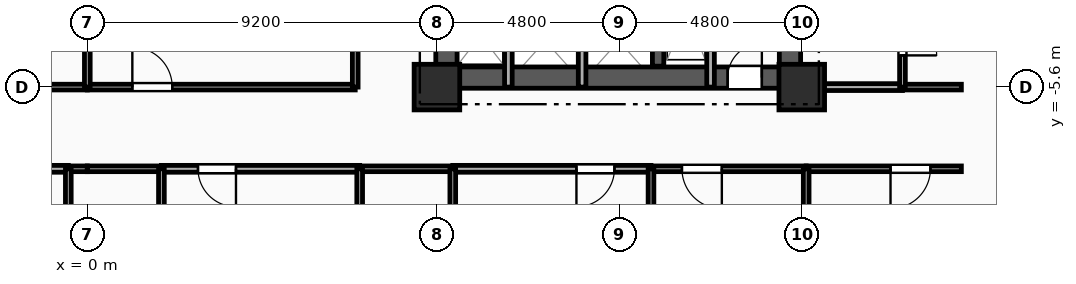
"""IFC4 building model, lengths in metres.
Left out: names, types, materials, properties, quantities, classifications, styles, units other than length and angle.
Written with IfcOpenShell. Run it as: python <this file> out.ifc"""

import sys

from ifc_helpers import new_model, si_unit, direction, frame, frame_2d, origin, origin_2d, place, context, subcontext, project, spatial, rectangle, extrude, element, fill, save


model = new_model("IFC4")
c1 = context("Model", 3, precision=1e-05, world=origin(), true_north=direction((0.0, 1.0)))
c2 = subcontext(c1, "Body", "Model", "MODEL_VIEW")
j1 = project(units=[si_unit("LENGTHUNIT", "METRE"), si_unit("PLANEANGLEUNIT", "RADIAN")], contexts=[c1])
p1 = place(None, origin())
s1 = spatial("IfcSite", under=j1, at=p1, CompositionType="ELEMENT")
p2 = place(p1, origin())
s2 = spatial("IfcBuilding", under=s1, at=p2, CompositionType="ELEMENT")
p3 = place(p2, frame((0.0, 0.0, 33.7)))
s3 = spatial("IfcBuildingStorey", under=s2, at=p3, CompositionType="ELEMENT", Elevation=33.7)
for number, where, z_axis, x_axis in (
    (1, (9.2, -5.6, 0.0), (0.0, 0.0, 1.0), (1.0, 0.0, 0.0)),
    (2, (18.8, -5.6, 0.0), (0.0, 0.0, 1.0), (1.0, 0.0, 0.0)),
):
    element("IfcColumn", number, at=place(p3, frame(where, z_axis=z_axis, x_axis=x_axis)), inside=s3, PredefinedType="COLUMN", context=c2, shape_type="SweptSolid", body=[
        extrude(rectangle(XDim=1.2, YDim=1.2, at=origin_2d()), origin(), (0.0, 0.0, 1.0), 3.35),
    ])
p4 = place(p3, frame((9.2, -5.35, 0.0), z_axis=(0.0, 0.0, 1.0), x_axis=(1.0, 0.0, 0.0)))
e3 = element("IfcWall", 3, at=p4, inside=s3, PredefinedType="SHEAR", context=c2, shape_type="SweptSolid", body=[
    extrude(rectangle(XDim=9.6, YDim=0.56, at=frame_2d((4.8, 0.0))), origin(), (0.0, 0.0, 1.0), 3.035),
])
p5 = place(p4, frame((7.65, 0.0, 0.0)))
e4 = element("IfcOpeningElement", 4, at=p5, cuts=e3, PredefinedType="OPENING", context=c2, shape_type="SweptSolid", body=[
    extrude(rectangle(XDim=0.9, YDim=2.1, at=frame_2d((0.45, 1.05))), frame((0.0, 0.29, 0.0), z_axis=(0.0, -1.0, 0.0), x_axis=(1.0, 0.0, 0.0)), (0.0, 0.0, 1.0), 0.58),
])
p6 = place(p3, frame((9.45, -5.05, 0.0), z_axis=(0.0, 0.0, 1.0), x_axis=(0.0, 1.0, 0.0)))
e5 = element("IfcWall", 5, at=p6, inside=s3, PredefinedType="SHEAR", context=c2, shape_type="SweptSolid", body=[
    extrude(rectangle(XDim=10.1, YDim=0.56, at=frame_2d((5.05, 0.0))), origin(), (0.0, 0.0, 1.0), 3.035),
])
p7 = place(p6, frame((7.15, 0.0, 0.0)))
e6 = element("IfcOpeningElement", 6, at=p7, cuts=e5, PredefinedType="OPENING", context=c2, shape_type="SweptSolid", body=[
    extrude(rectangle(XDim=0.9, YDim=2.1, at=frame_2d((0.45, 1.05))), frame((0.0, 0.29, 0.0), z_axis=(0.0, -1.0, 0.0), x_axis=(1.0, 0.0, 0.0)), (0.0, 0.0, 1.0), 0.58),
])
p8 = place(p6, frame((2.4, 0.0, 0.0)))
e7 = element("IfcOpeningElement", 7, at=p8, cuts=e5, PredefinedType="OPENING", context=c2, shape_type="SweptSolid", body=[
    extrude(rectangle(XDim=1.2, YDim=2.15, at=frame_2d((0.6, 1.075))), frame((0.0, 0.29, 0.0), z_axis=(0.0, -1.0, 0.0), x_axis=(1.0, 0.0, 0.0)), (0.0, 0.0, 1.0), 0.58),
])
p9 = place(p3, frame((18.49, -5.05, 0.0), z_axis=(0.0, 0.0, 1.0), x_axis=(0.0, 1.0, 0.0)))
e8 = element("IfcWall", 8, at=p9, inside=s3, PredefinedType="SHEAR", context=c2, shape_type="SweptSolid", body=[
    extrude(rectangle(XDim=10.1, YDim=0.56, at=frame_2d((5.05, 0.0))), origin(), (0.0, 0.0, 1.0), 3.035),
])
p10 = place(p3, frame((15.02, -5.05, 0.0), z_axis=(0.0, 0.0, 1.0), x_axis=(0.0, 1.0, 0.0)))
e9 = element("IfcWall", 9, at=p10, inside=s3, PredefinedType="SHEAR", context=c2, shape_type="SweptSolid", body=[
    extrude(rectangle(XDim=10.1, YDim=0.3, at=frame_2d((5.05, 0.0))), origin(), (0.0, 0.0, 1.0), 3.035),
])
p11 = place(p3, frame((16.4, -2.11, 0.0), z_axis=(0.0, 0.0, 1.0), x_axis=(0.0, -1.0, 0.0)))
e10 = element("IfcWall", 10, at=p11, inside=s3, PredefinedType="PARTITIONING", context=c2, shape_type="SweptSolid", body=[
    extrude(rectangle(XDim=3.49, YDim=0.2, at=frame_2d((1.745, 0.0))), origin(), (0.0, 0.0, 1.0), 3.035),
])
for number, where, z_axis, x_axis in (
    (11, (11.08, -5.6, 0.0), (0.0, 0.0, 1.0), (0.0, 1.0, 0.0)),
    (12, (13.02, -5.6, 0.0), (0.0, 0.0, 1.0), (0.0, 1.0, 0.0)),
):
    element("IfcWall", number, at=place(p3, frame(where, z_axis=z_axis, x_axis=x_axis)), inside=s3, PredefinedType="PARTITIONING", context=c2, shape_type="SweptSolid", body=[
        extrude(rectangle(XDim=2.25, YDim=0.2, at=frame_2d((1.125, 0.0))), origin(), (0.0, 0.0, 1.0), 3.035),
    ])
p12 = place(p3, frame((-0.5, -7.75, 0.0), z_axis=(0.0, 0.0, 1.0), x_axis=(-1.0, 0.0, 0.0)))
e13 = element("IfcWall", 13, at=p12, inside=s3, PredefinedType="PARTITIONING", context=c2, shape_type="SweptSolid", body=[
    extrude(rectangle(XDim=5.217, YDim=0.18, at=frame_2d((2.608, 0.0))), origin(), (0.0, 0.0, 1.0), 3.035),
])
p13 = place(p12, frame((0.962, 0.0, 0.0)))
e14 = element("IfcOpeningElement", 14, at=p13, cuts=e13, PredefinedType="OPENING", context=c2, shape_type="SweptSolid", body=[
    extrude(rectangle(XDim=1.0, YDim=2.15, at=frame_2d((0.5, 1.075))), frame((0.0, 0.1, 0.0), z_axis=(0.0, -1.0, 0.0), x_axis=(1.0, 0.0, 0.0)), (0.0, 0.0, 1.0), 0.2),
])
p14 = place(p3, frame((0.0, -7.75, 0.0), z_axis=(0.0, 0.0, 1.0), x_axis=(-1.0, 0.0, 0.0)))
e15 = element("IfcWall", 15, at=p14, inside=s3, PredefinedType="PLUMBINGWALL", context=c2, shape_type="SweptSolid", body=[
    extrude(rectangle(XDim=0.5, YDim=0.15, at=frame_2d((0.25, 0.0))), origin(), (0.0, 0.0, 1.0), 3.035),
])
p15 = place(p3, frame((-7.05, -5.6, 0.0), z_axis=(0.0, 0.0, 1.0), x_axis=(1.0, 0.0, 0.0)))
e16 = element("IfcWall", 16, at=p15, inside=s3, PredefinedType="PARTITIONING", context=c2, shape_type="SweptSolid", body=[
    extrude(rectangle(XDim=7.05, YDim=0.15, at=frame_2d((3.525, 0.0))), origin(), (0.0, 0.0, 1.0), 2.52),
])
p16 = place(p3, frame((18.8, -5.6, 0.0), z_axis=(0.0, 0.0, 1.0), x_axis=(1.0, 0.0, 0.0)))
e17 = element("IfcWall", 17, at=p16, inside=s3, PredefinedType="PARTITIONING", context=c2, shape_type="SweptSolid", body=[
    extrude(rectangle(XDim=2.65, YDim=0.18, at=frame_2d((1.325, 0.0))), origin(), (0.0, 0.0, 1.0), 3.035),
])
p17 = place(p3, frame((21.45, -5.6, 0.0), z_axis=(0.0, 0.0, 1.0), x_axis=(1.0, 0.0, 0.0)))
e18 = element("IfcWall", 18, at=p17, inside=s3, PredefinedType="PLUMBINGWALL", context=c2, shape_type="SweptSolid", body=[
    extrude(rectangle(XDim=1.55, YDim=0.15, at=frame_2d((0.775, 0.0))), origin(), (0.0, 0.0, 1.0), 3.035),
])
p18 = place(p3, frame((7.167, -7.75, 0.0), z_axis=(0.0, 0.0, 1.0), x_axis=(-1.0, 0.0, 0.0)))
e19 = element("IfcWall", 19, at=p18, inside=s3, PredefinedType="PARTITIONING", context=c2, shape_type="SweptSolid", body=[
    extrude(rectangle(XDim=5.217, YDim=0.18, at=frame_2d((2.608, 0.0))), origin(), (0.0, 0.0, 1.0), 3.035),
])
p19 = place(p18, frame((3.255, 0.0, 0.0)))
e20 = element("IfcOpeningElement", 20, at=p19, cuts=e19, PredefinedType="OPENING", context=c2, shape_type="SweptSolid", body=[
    extrude(rectangle(XDim=1.0, YDim=2.15, at=frame_2d((0.5, 1.075))), frame((0.0, 0.1, 0.0), z_axis=(0.0, -1.0, 0.0), x_axis=(1.0, 0.0, 0.0)), (0.0, 0.0, 1.0), 0.2),
])
p20 = place(p3, frame((1.95, -7.75, 0.0), z_axis=(0.0, 0.0, 1.0), x_axis=(-1.0, 0.0, 0.0)))
e21 = element("IfcWall", 21, at=p20, inside=s3, PredefinedType="PLUMBINGWALL", context=c2, shape_type="SweptSolid", body=[
    extrude(rectangle(XDim=1.95, YDim=0.15, at=frame_2d((0.975, 0.0))), origin(), (0.0, 0.0, 1.0), 3.035),
])
p21 = place(p3, frame((14.833, -7.75, 0.0), z_axis=(0.0, 0.0, 1.0), x_axis=(-1.0, 0.0, 0.0)))
e22 = element("IfcWall", 22, at=p21, inside=s3, PredefinedType="PARTITIONING", context=c2, shape_type="SweptSolid", body=[
    extrude(rectangle(XDim=5.216, YDim=0.18, at=frame_2d((2.608, 0.0))), origin(), (0.0, 0.0, 1.0), 3.035),
])
p22 = place(p21, frame((0.962, 0.0, 0.0)))
e23 = element("IfcOpeningElement", 23, at=p22, cuts=e22, PredefinedType="OPENING", context=c2, shape_type="SweptSolid", body=[
    extrude(rectangle(XDim=1.0, YDim=2.15, at=frame_2d((0.5, 1.075))), frame((0.0, 0.1, 0.0), z_axis=(0.0, -1.0, 0.0), x_axis=(1.0, 0.0, 0.0)), (0.0, 0.0, 1.0), 0.2),
])
p23 = place(p3, frame((9.617, -7.75, 0.0), z_axis=(0.0, 0.0, 1.0), x_axis=(-1.0, 0.0, 0.0)))
e24 = element("IfcWall", 24, at=p23, inside=s3, PredefinedType="PLUMBINGWALL", context=c2, shape_type="SweptSolid", body=[
    extrude(rectangle(XDim=2.45, YDim=0.15, at=frame_2d((1.225, 0.0))), origin(), (0.0, 0.0, 1.0), 3.035),
])
p24 = place(p3, frame((18.917, -7.75, 0.0), z_axis=(0.0, 0.0, 1.0), x_axis=(-1.0, 0.0, 0.0)))
e25 = element("IfcWall", 25, at=p24, inside=s3, PredefinedType="PARTITIONING", context=c2, shape_type="SweptSolid", body=[
    extrude(rectangle(XDim=4.083, YDim=0.15, at=frame_2d((2.042, 0.0))), origin(), (0.0, 0.0, 1.0), 3.035),
])
p25 = place(p24, frame((2.219, 0.0, 0.0)))
e26 = element("IfcOpeningElement", 26, at=p25, cuts=e25, PredefinedType="OPENING", context=c2, shape_type="SweptSolid", body=[
    extrude(rectangle(XDim=1.05, YDim=2.15, at=frame_2d((0.525, 1.075))), frame((0.0, 0.085, 0.0), z_axis=(0.0, -1.0, 0.0), x_axis=(1.0, 0.0, 0.0)), (0.0, 0.0, 1.0), 0.17),
])
p26 = place(p3, frame((23.0, -7.75, 0.0), z_axis=(0.0, 0.0, 1.0), x_axis=(-1.0, 0.0, 0.0)))
e27 = element("IfcWall", 27, at=p26, inside=s3, PredefinedType="PARTITIONING", context=c2, shape_type="SweptSolid", body=[
    extrude(rectangle(XDim=4.083, YDim=0.15, at=frame_2d((2.042, 0.0))), origin(), (0.0, 0.0, 1.0), 3.035),
])
p27 = place(p26, frame((0.814, 0.0, 0.0)))
e28 = element("IfcOpeningElement", 28, at=p27, cuts=e27, PredefinedType="OPENING", context=c2, shape_type="SweptSolid", body=[
    extrude(rectangle(XDim=1.05, YDim=2.15, at=frame_2d((0.525, 1.075))), frame((0.0, 0.085, 0.0), z_axis=(0.0, -1.0, 0.0), x_axis=(1.0, 0.0, 0.0)), (0.0, 0.0, 1.0), 0.17),
])
p28 = place(p3, frame((0.0, -5.6, 0.0), z_axis=(0.0, 0.0, 1.0), x_axis=(1.0, 0.0, 0.0)))
e29 = element("IfcWall", 29, at=p28, inside=s3, PredefinedType="PARTITIONING", context=c2, shape_type="SweptSolid", body=[
    extrude(rectangle(XDim=7.05, YDim=0.15, at=frame_2d((3.525, 0.0))), origin(), (0.0, 0.0, 1.0), 2.52),
])
p29 = place(p28, frame((1.185, 0.0, 0.0)))
e30 = element("IfcOpeningElement", 30, at=p29, cuts=e29, PredefinedType="OPENING", context=c2, shape_type="SweptSolid", body=[
    extrude(rectangle(XDim=1.05, YDim=2.15, at=frame_2d((0.525, 1.075))), frame((0.0, 0.085, 0.0), z_axis=(0.0, -1.0, 0.0), x_axis=(1.0, 0.0, 0.0)), (0.0, 0.0, 1.0), 0.17),
])
p30 = place(p3, frame((7.05, -5.6, 0.0), z_axis=(0.0, 0.0, 1.0), x_axis=(0.0, 1.0, 0.0)))
e31 = element("IfcWall", 31, at=p30, inside=s3, PredefinedType="PARTITIONING", context=c2, shape_type="SweptSolid", body=[
    extrude(rectangle(XDim=7.05, YDim=0.15, at=frame_2d((3.525, 0.0))), origin(), (0.0, 0.0, 1.0), 3.035),
])
p31 = place(p3, frame((21.45, -3.25, 0.0), z_axis=(0.0, 0.0, 1.0), x_axis=(0.0, -1.0, 0.0)))
e32 = element("IfcWall", 32, at=p31, inside=s3, PredefinedType="PLUMBINGWALL", context=c2, shape_type="SweptSolid", body=[
    extrude(rectangle(XDim=2.35, YDim=0.15, at=frame_2d((1.175, 0.0))), origin(), (0.0, 0.0, 1.0), 3.035),
])
p32 = place(p31, frame((0.616, 0.0, 0.0)))
e33 = element("IfcOpeningElement", 33, at=p32, cuts=e32, PredefinedType="OPENING", context=c2, shape_type="SweptSolid", body=[
    extrude(rectangle(XDim=0.9, YDim=2.1, at=frame_2d((0.45, 1.05))), frame((0.0, 0.085, 0.0), z_axis=(0.0, -1.0, 0.0), x_axis=(1.0, 0.0, 0.0)), (0.0, 0.0, 1.0), 0.17),
])
for number, where, z_axis, x_axis in (
    (34, (-0.5, -7.75, 0.0), (0.0, 0.0, 1.0), (0.0, -1.0, 0.0)),
    (35, (1.95, -9.9, 0.0), (0.0, 0.0, 1.0), (0.0, 1.0, 0.0)),
    (36, (7.167, -7.75, 0.0), (0.0, 0.0, 1.0), (0.0, -1.0, 0.0)),
    (37, (9.617, -9.9, 0.0), (0.0, 0.0, 1.0), (0.0, 1.0, 0.0)),
):
    element("IfcWall", number, at=place(p3, frame(where, z_axis=z_axis, x_axis=x_axis)), inside=s3, PredefinedType="PLUMBINGWALL", context=c2, shape_type="SweptSolid", body=[
        extrude(rectangle(XDim=2.15, YDim=0.15, at=frame_2d((1.075, 0.0))), origin(), (0.0, 0.0, 1.0), 3.035),
    ])
p33 = place(p3, frame((14.833, -7.75, 0.0), z_axis=(0.0, 0.0, 1.0), x_axis=(0.0, -1.0, 0.0)))
e38 = element("IfcWall", 38, at=p33, inside=s3, PredefinedType="PARTITIONING", context=c2, shape_type="SweptSolid", body=[
    extrude(rectangle(XDim=11.65, YDim=0.15, at=frame_2d((5.825, 0.0))), origin(), (0.0, 0.0, 1.0), 3.035),
])
p34 = place(p3, frame((18.917, -7.75, 0.0), z_axis=(0.0, 0.0, 1.0), x_axis=(0.0, -1.0, 0.0)))
e39 = element("IfcWall", 39, at=p34, inside=s3, PredefinedType="PARTITIONING", context=c2, shape_type="SweptSolid", body=[
    extrude(rectangle(XDim=11.65, YDim=0.15, at=frame_2d((5.825, 0.0))), origin(), (0.0, 0.0, 1.0), 2.52),
])
p35 = place(p3, frame((0.0, 1.45, 0.0), z_axis=(0.0, 0.0, 1.0), x_axis=(0.0, -1.0, 0.0)))
e40 = element("IfcWall", 40, at=p35, inside=s3, PredefinedType="PARTITIONING", context=c2, shape_type="SweptSolid", body=[
    extrude(rectangle(XDim=7.05, YDim=0.15, at=frame_2d((3.525, 0.0))), origin(), (0.0, 0.0, 1.0), 3.035),
])
p36 = place(p5, origin())
e41 = element("IfcDoor", 41, at=p36, inside=s3, OperationType="SINGLE_SWING_RIGHT", PredefinedType="DOOR", context=c2, shape_type="SweptSolid", body=[
    extrude(rectangle(XDim=0.9, YDim=2.1, at=frame_2d((0.45, 1.05))), frame((0.0, 0.025, 0.0), z_axis=(0.0, -1.0, 0.0), x_axis=(1.0, 0.0, 0.0)), (0.0, 0.0, 1.0), 0.05),
])
fill(e4, e41)
p37 = place(p19, origin())
e42 = element("IfcDoor", 42, at=p37, inside=s3, OperationType="SINGLE_SWING_LEFT", PredefinedType="DOOR", context=c2, shape_type="SweptSolid", body=[
    extrude(rectangle(XDim=1.0, YDim=2.15, at=frame_2d((0.5, 1.075))), frame((0.0, 0.025, 0.0), z_axis=(0.0, -1.0, 0.0), x_axis=(1.0, 0.0, 0.0)), (0.0, 0.0, 1.0), 0.05),
])
fill(e20, e42)
p38 = place(p22, origin())
e43 = element("IfcDoor", 43, at=p38, inside=s3, OperationType="SINGLE_SWING_RIGHT", PredefinedType="DOOR", context=c2, shape_type="SweptSolid", body=[
    extrude(rectangle(XDim=1.0, YDim=2.15, at=frame_2d((0.5, 1.075))), frame((0.0, 0.025, 0.0), z_axis=(0.0, -1.0, 0.0), x_axis=(1.0, 0.0, 0.0)), (0.0, 0.0, 1.0), 0.05),
])
fill(e23, e43)
p39 = place(p25, origin())
e44 = element("IfcDoor", 44, at=p39, inside=s3, OperationType="SINGLE_SWING_LEFT", PredefinedType="DOOR", context=c2, shape_type="SweptSolid", body=[
    extrude(rectangle(XDim=1.05, YDim=2.15, at=frame_2d((0.525, 1.075))), frame((0.0, 0.025, 0.0), z_axis=(0.0, -1.0, 0.0), x_axis=(1.0, 0.0, 0.0)), (0.0, 0.0, 1.0), 0.05),
])
fill(e26, e44)
p40 = place(p27, origin())
e45 = element("IfcDoor", 45, at=p40, inside=s3, OperationType="SINGLE_SWING_RIGHT", PredefinedType="DOOR", context=c2, shape_type="SweptSolid", body=[
    extrude(rectangle(XDim=1.05, YDim=2.15, at=frame_2d((0.525, 1.075))), frame((0.0, 0.025, 0.0), z_axis=(0.0, -1.0, 0.0), x_axis=(1.0, 0.0, 0.0)), (0.0, 0.0, 1.0), 0.05),
])
fill(e28, e45)
p41 = place(p29, origin())
e46 = element("IfcDoor", 46, at=p41, inside=s3, OperationType="SINGLE_SWING_LEFT", PredefinedType="DOOR", context=c2, shape_type="SweptSolid", body=[
    extrude(rectangle(XDim=1.05, YDim=2.15, at=frame_2d((0.525, 1.075))), frame((0.0, 0.025, 0.0), z_axis=(0.0, -1.0, 0.0), x_axis=(1.0, 0.0, 0.0)), (0.0, 0.0, 1.0), 0.05),
])
fill(e30, e46)
p42 = place(p32, origin())
e47 = element("IfcDoor", 47, at=p42, inside=s3, OperationType="SINGLE_SWING_RIGHT", PredefinedType="DOOR", context=c2, shape_type="SweptSolid", body=[
    extrude(rectangle(XDim=0.9, YDim=2.1, at=frame_2d((0.45, 1.05))), frame((0.0, 0.025, 0.0), z_axis=(0.0, -1.0, 0.0), x_axis=(1.0, 0.0, 0.0)), (0.0, 0.0, 1.0), 0.05),
])
fill(e33, e47)
save(model, sys.argv[1])
